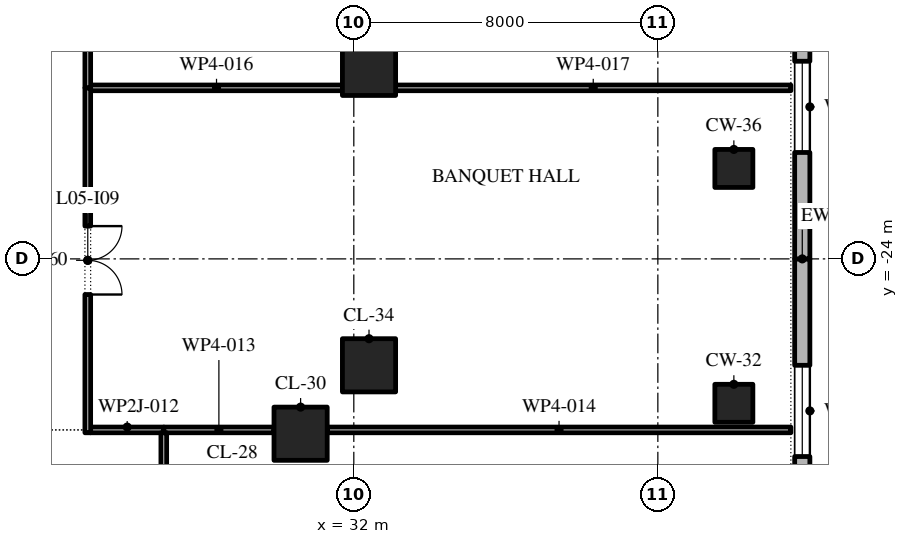
"""IFC4 building model, lengths in metres.
Left out: names, types, materials, properties, quantities, classifications, styles, units other than length and angle.
Written with IfcOpenShell. Run it as: python <this file> out.ifc"""

import sys

from ifc_helpers import new_model, si_unit, direction, frame, frame_2d, origin, origin_2d, place, context, subcontext, project, spatial, polyline, rectangle, outline, extrude, element, fill, save


model = new_model("IFC4")
c1 = context("Model", 3, precision=1e-05, world=origin(), true_north=direction((0.0, 1.0)))
c2 = subcontext(c1, "Body", "Model", "MODEL_VIEW")
j1 = project(units=[si_unit("LENGTHUNIT", "METRE"), si_unit("PLANEANGLEUNIT", "RADIAN")], contexts=[c1])
p1 = place(None, origin())
s1 = spatial("IfcSite", under=j1, at=p1, CompositionType="ELEMENT")
p2 = place(p1, origin())
s2 = spatial("IfcBuilding", under=s1, at=p2, CompositionType="ELEMENT")
p3 = place(p2, frame((0.0, 0.0, 28.8)))
s3 = spatial("IfcBuildingStorey", under=s2, at=p3, CompositionType="ELEMENT", Elevation=28.8)
p4 = place(p3, frame((30.6, -28.6, 0.0), z_axis=(0.0, 0.0, 1.0), x_axis=(1.0, 0.0, 0.0)))
e1 = element("IfcColumn", 1, at=p4, inside=s3, PredefinedType="COLUMN", context=c2, shape_type="SweptSolid", body=[
    extrude(rectangle(XDim=1.4, YDim=1.4, at=origin_2d()), origin(), (0.0, 0.0, 1.0), 4.8),
])
p5 = place(p3, frame((42.0, -27.8, 0.0), z_axis=(0.0, 0.0, 1.0), x_axis=(1.0, 0.0, 0.0)))
e2 = element("IfcColumn", 2, at=p5, inside=s3, PredefinedType="COLUMN", context=c2, shape_type="SweptSolid", body=[
    extrude(rectangle(XDim=1.0, YDim=1.0, at=origin_2d()), origin(), (0.0, 0.0, 1.0), 4.35),
])
p6 = place(p3, frame((32.4, -26.8, 0.0), z_axis=(0.0, 0.0, 1.0), x_axis=(1.0, 0.0, 0.0)))
e3 = element("IfcColumn", 3, at=p6, inside=s3, PredefinedType="COLUMN", context=c2, shape_type="SweptSolid", body=[
    extrude(rectangle(XDim=1.4, YDim=1.4, at=origin_2d()), origin(), (0.0, 0.0, 1.0), 4.8),
])
p7 = place(p3, frame((42.0, -21.62, 0.0), z_axis=(0.0, 0.0, 1.0), x_axis=(1.0, 0.0, 0.0)))
e4 = element("IfcColumn", 4, at=p7, inside=s3, PredefinedType="COLUMN", context=c2, shape_type="SweptSolid", body=[
    extrude(rectangle(XDim=1.0, YDim=1.0, at=origin_2d()), origin(), (0.0, 0.0, 1.0), 4.35),
])
p8 = place(p3, frame((32.4, -19.0, 0.0), z_axis=(0.0, 0.0, 1.0), x_axis=(1.0, 0.0, 0.0)))
e5 = element("IfcColumn", 5, at=p8, inside=s3, PredefinedType="COLUMN", context=c2, shape_type="SweptSolid", body=[
    extrude(rectangle(XDim=1.4, YDim=1.4, at=origin_2d()), origin(), (0.0, 0.0, 1.0), 4.8),
])
p9 = place(p3, frame((43.8, -32.0, 0.0), z_axis=(0.0, 0.0, 1.0), x_axis=(0.0, 1.0, 0.0)))
e6 = element("IfcWall", 6, at=p9, inside=s3, PredefinedType="STANDARD", context=c2, shape_type="SweptSolid", body=[
    extrude(rectangle(XDim=8.0, YDim=0.4, at=frame_2d((4.0, 0.0))), origin(), (0.0, 0.0, 1.0), 4.35),
])
p10 = place(p9, frame((2.8, 0.0, 0.9)))
e7 = element("IfcOpeningElement", 7, at=p10, cuts=e6, PredefinedType="OPENING", context=c2, shape_type="SweptSolid", body=[
    extrude(outline(polyline([(0.0, 0.0), (2.4, 0.0), (2.4, 1.425), (2.378, 1.677), (2.312, 1.921), (2.205, 2.15), (2.06, 2.356), (1.881, 2.535), (1.674, 2.679), (1.444, 2.785), (1.2, 2.85), (0.956, 2.785), (0.726, 2.679), (0.519, 2.535), (0.34, 2.356), (0.195, 2.15), (0.088, 1.921), (0.022, 1.677), (0.0, 1.425), (0.0, 0.0)])), frame((0.0, 0.21, 0.0), z_axis=(0.0, -1.0, 0.0), x_axis=(1.0, 0.0, 0.0)), (0.0, 0.0, 1.0), 0.42),
])
p11 = place(p3, frame((43.8, -24.0, 0.0), z_axis=(0.0, 0.0, 1.0), x_axis=(0.0, 1.0, 0.0)))
e8 = element("IfcWall", 8, at=p11, inside=s3, PredefinedType="STANDARD", context=c2, shape_type="SweptSolid", body=[
    extrude(rectangle(XDim=8.0, YDim=0.4, at=frame_2d((4.0, 0.0))), origin(), (0.0, 0.0, 1.0), 4.35),
])
p12 = place(p11, frame((2.8, 0.0, 0.9)))
e9 = element("IfcOpeningElement", 9, at=p12, cuts=e8, PredefinedType="OPENING", context=c2, shape_type="SweptSolid", body=[
    extrude(outline(polyline([(0.0, 0.0), (2.4, 0.0), (2.4, 1.425), (2.378, 1.677), (2.312, 1.921), (2.205, 2.15), (2.06, 2.356), (1.881, 2.535), (1.674, 2.679), (1.444, 2.785), (1.2, 2.85), (0.956, 2.785), (0.726, 2.679), (0.519, 2.535), (0.34, 2.356), (0.195, 2.15), (0.088, 1.921), (0.022, 1.677), (0.0, 1.425), (0.0, 0.0)])), frame((0.0, 0.21, 0.0), z_axis=(0.0, -1.0, 0.0), x_axis=(1.0, 0.0, 0.0)), (0.0, 0.0, 1.0), 0.42),
])
p13 = place(p3, frame((25.075, -28.5, 0.0), z_axis=(0.0, 0.0, 1.0), x_axis=(1.0, 0.0, 0.0)))
e10 = element("IfcWall", 10, at=p13, inside=s3, PredefinedType="PARTITIONING", context=c2, shape_type="SweptSolid", body=[
    extrude(rectangle(XDim=1.925, YDim=0.15, at=frame_2d((0.962, 0.0))), origin(), (0.0, 0.0, 1.0), 4.35),
])
p14 = place(p3, frame((27.0, -28.5, 0.0), z_axis=(0.0, 0.0, 1.0), x_axis=(1.0, 0.0, 0.0)))
e11 = element("IfcWall", 11, at=p14, inside=s3, PredefinedType="PARTITIONING", context=c2, shape_type="SweptSolid", body=[
    extrude(rectangle(XDim=2.9, YDim=0.15, at=frame_2d((1.45, 0.0))), origin(), (0.0, 0.0, 1.0), 4.35),
])
p15 = place(p3, frame((31.3, -28.5, 0.0), z_axis=(0.0, 0.0, 1.0), x_axis=(1.0, 0.0, 0.0)))
e12 = element("IfcWall", 12, at=p15, inside=s3, PredefinedType="PARTITIONING", context=c2, shape_type="SweptSolid", body=[
    extrude(rectangle(XDim=12.2, YDim=0.15, at=frame_2d((6.1, 0.0))), origin(), (0.0, 0.0, 1.0), 4.35),
])
p16 = place(p3, frame((25.075, -19.5, 0.0), z_axis=(0.0, 0.0, 1.0), x_axis=(1.0, 0.0, 0.0)))
e13 = element("IfcWall", 13, at=p16, inside=s3, PredefinedType="PARTITIONING", context=c2, shape_type="SweptSolid", body=[
    extrude(rectangle(XDim=6.625, YDim=0.15, at=frame_2d((3.312, 0.0))), origin(), (0.0, 0.0, 1.0), 4.35),
])
p17 = place(p3, frame((33.1, -19.5, 0.0), z_axis=(0.0, 0.0, 1.0), x_axis=(1.0, 0.0, 0.0)))
e14 = element("IfcWall", 14, at=p17, inside=s3, PredefinedType="PARTITIONING", context=c2, shape_type="SweptSolid", body=[
    extrude(rectangle(XDim=10.4, YDim=0.15, at=frame_2d((5.2, 0.0))), origin(), (0.0, 0.0, 1.0), 4.35),
])
p18 = place(p3, frame((25.0, -28.575, 0.0), z_axis=(0.0, 0.0, 1.0), x_axis=(0.0, 1.0, 0.0)))
e15 = element("IfcWall", 15, at=p18, inside=s3, PredefinedType="PARTITIONING", context=c2, shape_type="SweptSolid", body=[
    extrude(rectangle(XDim=9.075, YDim=0.15, at=frame_2d((4.538, 0.0))), origin(), (0.0, 0.0, 1.0), 4.35),
])
p19 = place(p18, frame((3.637, 0.0, 0.0)))
e16 = element("IfcOpeningElement", 16, at=p19, cuts=e15, PredefinedType="OPENING", context=c2, shape_type="SweptSolid", body=[
    extrude(rectangle(XDim=1.8, YDim=2.1, at=frame_2d((0.9, 1.05))), frame((0.0, 0.085, 0.0), z_axis=(0.0, -1.0, 0.0), x_axis=(1.0, 0.0, 0.0)), (0.0, 0.0, 1.0), 0.17),
])
p20 = place(p3, frame((25.0, -19.5, 0.0), z_axis=(0.0, 0.0, 1.0), x_axis=(0.0, 1.0, 0.0)))
e17 = element("IfcWall", 17, at=p20, inside=s3, PredefinedType="PARTITIONING", context=c2, shape_type="SweptSolid", body=[
    extrude(rectangle(XDim=10.5, YDim=0.15, at=frame_2d((5.25, 0.0))), origin(), (0.0, 0.0, 1.0), 4.35),
])
p21 = place(p20, frame((4.35, 0.0, 0.0)))
e18 = element("IfcOpeningElement", 18, at=p21, cuts=e17, PredefinedType="OPENING", context=c2, shape_type="SweptSolid", body=[
    extrude(rectangle(XDim=1.8, YDim=2.1, at=frame_2d((0.9, 1.05))), frame((0.0, 0.085, 0.0), z_axis=(0.0, -1.0, 0.0), x_axis=(1.0, 0.0, 0.0)), (0.0, 0.0, 1.0), 0.17),
])
p22 = place(p3, frame((27.0, -32.0, 0.0), z_axis=(0.0, 0.0, 1.0), x_axis=(0.0, 1.0, 0.0)))
e19 = element("IfcWall", 19, at=p22, inside=s3, PredefinedType="PARTITIONING", context=c2, shape_type="SweptSolid", body=[
    extrude(rectangle(XDim=3.425, YDim=0.15, at=frame_2d((1.712, 0.0))), origin(), (0.0, 0.0, 1.0), 4.35),
])
p23 = place(p10, origin())
e20 = element("IfcWindow", 20, at=p23, inside=s3, PartitioningType="DOUBLE_PANEL_VERTICAL", PredefinedType="WINDOW", context=c2, shape_type="SweptSolid", body=[
    extrude(outline(polyline([(0.0, 0.0), (2.4, 0.0), (2.4, 1.425), (2.378, 1.677), (2.312, 1.921), (2.205, 2.15), (2.06, 2.356), (1.881, 2.535), (1.674, 2.679), (1.444, 2.785), (1.2, 2.85), (0.956, 2.785), (0.726, 2.679), (0.519, 2.535), (0.34, 2.356), (0.195, 2.15), (0.088, 1.921), (0.022, 1.677), (0.0, 1.425), (0.0, 0.0)])), frame((0.0, 0.03, 0.0), z_axis=(0.0, -1.0, 0.0), x_axis=(1.0, 0.0, 0.0)), (0.0, 0.0, 1.0), 0.06),
])
fill(e7, e20)
p24 = place(p12, origin())
e21 = element("IfcWindow", 21, at=p24, inside=s3, PartitioningType="DOUBLE_PANEL_VERTICAL", PredefinedType="WINDOW", context=c2, shape_type="SweptSolid", body=[
    extrude(outline(polyline([(0.0, 0.0), (2.4, 0.0), (2.4, 1.425), (2.378, 1.677), (2.312, 1.921), (2.205, 2.15), (2.06, 2.356), (1.881, 2.535), (1.674, 2.679), (1.444, 2.785), (1.2, 2.85), (0.956, 2.785), (0.726, 2.679), (0.519, 2.535), (0.34, 2.356), (0.195, 2.15), (0.088, 1.921), (0.022, 1.677), (0.0, 1.425), (0.0, 0.0)])), frame((0.0, 0.03, 0.0), z_axis=(0.0, -1.0, 0.0), x_axis=(1.0, 0.0, 0.0)), (0.0, 0.0, 1.0), 0.06),
])
fill(e9, e21)
p25 = place(p19, frame((1.8, 0.0, 0.0), z_axis=(0.0, 0.0, 1.0), x_axis=(-1.0, 0.0, 0.0)))
e22 = element("IfcDoor", 22, at=p25, inside=s3, OperationType="SINGLE_SWING_RIGHT", PredefinedType="DOOR", context=c2, shape_type="SweptSolid", body=[
    extrude(rectangle(XDim=1.8, YDim=2.1, at=frame_2d((0.9, 1.05))), frame((0.0, 0.025, 0.0), z_axis=(0.0, -1.0, 0.0), x_axis=(1.0, 0.0, 0.0)), (0.0, 0.0, 1.0), 0.05),
])
fill(e16, e22)
save(model, sys.argv[1])
